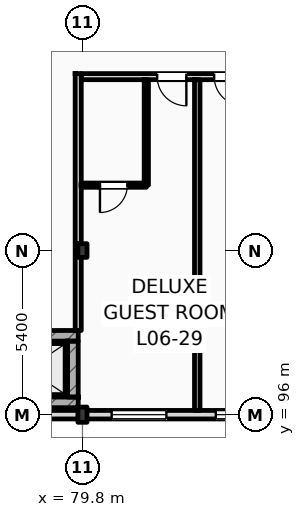
"""IFC4 building model, lengths in metres.
Left out: names, types, materials, properties, quantities, classifications, styles, units other than length and angle.
Written with IfcOpenShell. Run it as: python <this file> out.ifc"""

import sys

from ifc_helpers import new_model, si_unit, direction, frame, frame_2d, origin, origin_2d, place, context, subcontext, project, spatial, rectangle, i_section, extrude, element, fill, save


model = new_model("IFC4")
c1 = context("Model", 3, precision=1e-05, world=origin(), true_north=direction((0.0, 1.0)))
c2 = subcontext(c1, "Body", "Model", "MODEL_VIEW")
j1 = project(units=[si_unit("LENGTHUNIT", "METRE"), si_unit("PLANEANGLEUNIT", "RADIAN")], contexts=[c1])
p1 = place(None, origin())
s1 = spatial("IfcSite", under=j1, at=p1, CompositionType="ELEMENT")
p2 = place(p1, origin())
s2 = spatial("IfcBuilding", under=s1, at=p2, CompositionType="ELEMENT")
p3 = place(p2, frame((0.0, 0.0, 28.2)))
s3 = spatial("IfcBuildingStorey", under=s2, at=p3, CompositionType="ELEMENT", Elevation=28.2)
p4 = place(p3, frame((79.8, 96.0, 0.0), z_axis=(0.0, 0.0, 1.0), x_axis=(1.0, 0.0, 0.0)))
e1 = element("IfcColumn", 1, at=p4, inside=s3, PredefinedType="COLUMN", context=c2, shape_type="SweptSolid", body=[
    extrude(i_section(OverallWidth=0.3, OverallDepth=0.5, WebThickness=0.014, FlangeThickness=0.028, FilletRadius=0.027, at=origin_2d()), origin(), (0.0, 0.0, 1.0), 3.6),
])
p5 = place(p3, frame((79.8, 101.4, 0.0), z_axis=(0.0, 0.0, 1.0), x_axis=(1.0, 0.0, 0.0)))
e2 = element("IfcColumn", 2, at=p5, inside=s3, PredefinedType="COLUMN", context=c2, shape_type="SweptSolid", body=[
    extrude(i_section(OverallWidth=0.3, OverallDepth=0.45, WebThickness=0.014, FlangeThickness=0.026, FilletRadius=0.027, at=origin_2d()), origin(), (0.0, 0.0, 1.0), 3.6),
])
p6 = place(p3, frame((25.2, 96.0, 0.0), z_axis=(0.0, 0.0, 1.0), x_axis=(1.0, 0.0, 0.0)))
e3 = element("IfcWall", 3, at=p6, inside=s3, PredefinedType="STANDARD", context=c2, shape_type="SweptSolid", body=[
    extrude(rectangle(XDim=94.8, YDim=0.28, at=frame_2d((47.4, 0.0))), origin(), (0.0, 0.0, 1.0), 2.8),
])
p7 = place(p6, frame((16.454, 0.0, 0.9)))
e4 = element("IfcOpeningElement", 4, at=p7, cuts=e3, PredefinedType="OPENING", context=c2, shape_type="SweptSolid", body=[
    extrude(rectangle(XDim=2.7, YDim=1.72, at=frame_2d((1.35, 0.86))), frame((0.0, 0.15, 0.0), z_axis=(0.0, -1.0, 0.0), x_axis=(1.0, 0.0, 0.0)), (0.0, 0.0, 1.0), 0.3),
])
p8 = place(p6, frame((20.068, 0.0, 0.9)))
e5 = element("IfcOpeningElement", 5, at=p8, cuts=e3, PredefinedType="OPENING", context=c2, shape_type="SweptSolid", body=[
    extrude(rectangle(XDim=2.389, YDim=1.72, at=frame_2d((1.194, 0.86))), frame((0.0, 0.15, 0.0), z_axis=(0.0, -1.0, 0.0), x_axis=(1.0, 0.0, 0.0)), (0.0, 0.0, 1.0), 0.3),
])
p9 = place(p6, frame((24.277, 0.0, 0.9)))
e6 = element("IfcOpeningElement", 6, at=p9, cuts=e3, PredefinedType="OPENING", context=c2, shape_type="SweptSolid", body=[
    extrude(rectangle(XDim=1.8, YDim=1.72, at=frame_2d((0.9, 0.86))), frame((0.0, 0.15, 0.0), z_axis=(0.0, -1.0, 0.0), x_axis=(1.0, 0.0, 0.0)), (0.0, 0.0, 1.0), 0.3),
])
p10 = place(p6, frame((27.885, 0.0, 0.9)))
e7 = element("IfcOpeningElement", 7, at=p10, cuts=e3, PredefinedType="OPENING", context=c2, shape_type="SweptSolid", body=[
    extrude(rectangle(XDim=2.388, YDim=1.72, at=frame_2d((1.194, 0.86))), frame((0.0, 0.15, 0.0), z_axis=(0.0, -1.0, 0.0), x_axis=(1.0, 0.0, 0.0)), (0.0, 0.0, 1.0), 0.3),
])
p11 = place(p6, frame((32.093, 0.0, 0.9)))
e8 = element("IfcOpeningElement", 8, at=p11, cuts=e3, PredefinedType="OPENING", context=c2, shape_type="SweptSolid", body=[
    extrude(rectangle(XDim=1.8, YDim=1.72, at=frame_2d((0.9, 0.86))), frame((0.0, 0.15, 0.0), z_axis=(0.0, -1.0, 0.0), x_axis=(1.0, 0.0, 0.0)), (0.0, 0.0, 1.0), 0.3),
])
p12 = place(p6, frame((35.702, 0.0, 0.9)))
e9 = element("IfcOpeningElement", 9, at=p12, cuts=e3, PredefinedType="OPENING", context=c2, shape_type="SweptSolid", body=[
    extrude(rectangle(XDim=2.488, YDim=1.72, at=frame_2d((1.244, 0.86))), frame((0.0, 0.15, 0.0), z_axis=(0.0, -1.0, 0.0), x_axis=(1.0, 0.0, 0.0)), (0.0, 0.0, 1.0), 0.3),
])
p13 = place(p6, frame((55.56, 0.0, 0.9)))
e10 = element("IfcOpeningElement", 10, at=p13, cuts=e3, PredefinedType="OPENING", context=c2, shape_type="SweptSolid", body=[
    extrude(rectangle(XDim=1.8, YDim=1.72, at=frame_2d((0.9, 0.86))), frame((0.0, 0.15, 0.0), z_axis=(0.0, -1.0, 0.0), x_axis=(1.0, 0.0, 0.0)), (0.0, 0.0, 1.0), 0.3),
])
p14 = place(p6, frame((58.985, 0.0, 0.9)))
e11 = element("IfcOpeningElement", 11, at=p14, cuts=e3, PredefinedType="OPENING", context=c2, shape_type="SweptSolid", body=[
    extrude(rectangle(XDim=1.8, YDim=1.72, at=frame_2d((0.9, 0.86))), frame((0.0, 0.15, 0.0), z_axis=(0.0, -1.0, 0.0), x_axis=(1.0, 0.0, 0.0)), (0.0, 0.0, 1.0), 0.3),
])
p15 = place(p6, frame((63.21, 0.0, 0.9)))
e12 = element("IfcOpeningElement", 12, at=p15, cuts=e3, PredefinedType="OPENING", context=c2, shape_type="SweptSolid", body=[
    extrude(rectangle(XDim=2.525, YDim=1.72, at=frame_2d((1.262, 0.86))), frame((0.0, 0.15, 0.0), z_axis=(0.0, -1.0, 0.0), x_axis=(1.0, 0.0, 0.0)), (0.0, 0.0, 1.0), 0.3),
])
p16 = place(p6, frame((66.955, 0.0, 0.9)))
e13 = element("IfcOpeningElement", 13, at=p16, cuts=e3, PredefinedType="OPENING", context=c2, shape_type="SweptSolid", body=[
    extrude(rectangle(XDim=1.8, YDim=1.72, at=frame_2d((0.9, 0.86))), frame((0.0, 0.15, 0.0), z_axis=(0.0, -1.0, 0.0), x_axis=(1.0, 0.0, 0.0)), (0.0, 0.0, 1.0), 0.3),
])
p17 = place(p6, frame((71.892, 0.0, 0.9)))
e14 = element("IfcOpeningElement", 14, at=p17, cuts=e3, PredefinedType="OPENING", context=c2, shape_type="SweptSolid", body=[
    extrude(rectangle(XDim=1.1, YDim=1.5, at=frame_2d((0.55, 0.75))), frame((0.0, 0.15, 0.0), z_axis=(0.0, -1.0, 0.0), x_axis=(1.0, 0.0, 0.0)), (0.0, 0.0, 1.0), 0.3),
])
p18 = place(p6, frame((75.802, 0.0, 0.9)))
e15 = element("IfcOpeningElement", 15, at=p18, cuts=e3, PredefinedType="OPENING", context=c2, shape_type="SweptSolid", body=[
    extrude(rectangle(XDim=1.25, YDim=1.6, at=frame_2d((0.625, 0.8))), frame((0.0, 0.15, 0.0), z_axis=(0.0, -1.0, 0.0), x_axis=(1.0, 0.0, 0.0)), (0.0, 0.0, 1.0), 0.3),
])
p19 = place(p6, frame((79.712, 0.0, 0.9)))
e16 = element("IfcOpeningElement", 16, at=p19, cuts=e3, PredefinedType="OPENING", context=c2, shape_type="SweptSolid", body=[
    extrude(rectangle(XDim=1.4, YDim=1.7, at=frame_2d((0.7, 0.85))), frame((0.0, 0.15, 0.0), z_axis=(0.0, -1.0, 0.0), x_axis=(1.0, 0.0, 0.0)), (0.0, 0.0, 1.0), 0.3),
])
p20 = place(p6, frame((83.597, 0.0, 0.9)))
e17 = element("IfcOpeningElement", 17, at=p20, cuts=e3, PredefinedType="OPENING", context=c2, shape_type="SweptSolid", body=[
    extrude(rectangle(XDim=1.6, YDim=1.72, at=frame_2d((0.8, 0.86))), frame((0.0, 0.15, 0.0), z_axis=(0.0, -1.0, 0.0), x_axis=(1.0, 0.0, 0.0)), (0.0, 0.0, 1.0), 0.3),
])
p21 = place(p6, frame((87.507, 0.0, 0.9)))
e18 = element("IfcOpeningElement", 18, at=p21, cuts=e3, PredefinedType="OPENING", context=c2, shape_type="SweptSolid", body=[
    extrude(rectangle(XDim=1.75, YDim=1.72, at=frame_2d((0.875, 0.86))), frame((0.0, 0.15, 0.0), z_axis=(0.0, -1.0, 0.0), x_axis=(1.0, 0.0, 0.0)), (0.0, 0.0, 1.0), 0.3),
])
p22 = place(p6, frame((91.328, 0.0, 0.9)))
e19 = element("IfcOpeningElement", 19, at=p22, cuts=e3, PredefinedType="OPENING", context=c2, shape_type="SweptSolid", body=[
    extrude(rectangle(XDim=2.0, YDim=1.72, at=frame_2d((1.0, 0.86))), frame((0.0, 0.15, 0.0), z_axis=(0.0, -1.0, 0.0), x_axis=(1.0, 0.0, 0.0)), (0.0, 0.0, 1.0), 0.3),
])
p23 = place(p3, frame((76.67, 98.595, 0.0), z_axis=(0.0, 0.0, 1.0), x_axis=(1.0, 0.0, 0.0)))
e20 = element("IfcWall", 20, at=p23, inside=s3, PredefinedType="SHEAR", context=c2, shape_type="SweptSolid", body=[
    extrude(rectangle(XDim=2.99, YDim=0.35, at=frame_2d((1.495, 0.0))), origin(), (0.0, 0.0, 1.0), 3.36),
])
p24 = place(p23, frame((0.695, 0.0, 0.0)))
e21 = element("IfcOpeningElement", 21, at=p24, cuts=e20, PredefinedType="OPENING", context=c2, shape_type="SweptSolid", body=[
    extrude(rectangle(XDim=1.25, YDim=2.25, at=frame_2d((0.625, 1.125))), frame((0.0, 0.185, 0.0), z_axis=(0.0, -1.0, 0.0), x_axis=(1.0, 0.0, 0.0)), (0.0, 0.0, 1.0), 0.37),
])
p25 = place(p3, frame((76.67, 96.405, 0.0), z_axis=(0.0, 0.0, 1.0), x_axis=(1.0, 0.0, 0.0)))
e22 = element("IfcWall", 22, at=p25, inside=s3, PredefinedType="SHEAR", context=c2, shape_type="SweptSolid", body=[
    extrude(rectangle(XDim=2.99, YDim=0.35, at=frame_2d((1.495, 0.0))), origin(), (0.0, 0.0, 1.0), 3.36),
])
p26 = place(p3, frame((79.485, 96.58, 0.0), z_axis=(0.0, 0.0, 1.0), x_axis=(0.0, 1.0, 0.0)))
e23 = element("IfcWall", 23, at=p26, inside=s3, PredefinedType="SHEAR", context=c2, shape_type="SweptSolid", body=[
    extrude(rectangle(XDim=1.84, YDim=0.35, at=frame_2d((0.92, 0.0))), origin(), (0.0, 0.0, 1.0), 2.99),
])
p27 = place(p3, frame((79.76, 107.12, 0.0), z_axis=(0.0, 0.0, 1.0), x_axis=(1.0, 0.0, 0.0)))
e24 = element("IfcWall", 24, at=p27, inside=s3, PredefinedType="PARTITIONING", context=c2, shape_type="SweptSolid", body=[
    extrude(rectangle(XDim=40.1, YDim=0.2, at=frame_2d((20.05, 0.0))), origin(), (0.0, 0.0, 1.0), 3.36),
])
p28 = place(p27, frame((2.497, 0.0, 0.0)))
e25 = element("IfcOpeningElement", 25, at=p28, cuts=e24, PredefinedType="OPENING", context=c2, shape_type="SweptSolid", body=[
    extrude(rectangle(XDim=0.96, YDim=2.2, at=frame_2d((0.48, 1.1))), frame((0.0, 0.11, 0.0), z_axis=(0.0, -1.0, 0.0), x_axis=(1.0, 0.0, 0.0)), (0.0, 0.0, 1.0), 0.22),
])
p29 = place(p27, frame((4.372, 0.0, 0.0)))
e26 = element("IfcOpeningElement", 26, at=p29, cuts=e24, PredefinedType="OPENING", context=c2, shape_type="SweptSolid", body=[
    extrude(rectangle(XDim=0.96, YDim=2.2, at=frame_2d((0.48, 1.1))), frame((0.0, 0.11, 0.0), z_axis=(0.0, -1.0, 0.0), x_axis=(1.0, 0.0, 0.0)), (0.0, 0.0, 1.0), 0.22),
])
p30 = place(p27, frame((10.507, 0.0, 0.0)))
e27 = element("IfcOpeningElement", 27, at=p30, cuts=e24, PredefinedType="OPENING", context=c2, shape_type="SweptSolid", body=[
    extrude(rectangle(XDim=0.96, YDim=2.2, at=frame_2d((0.48, 1.1))), frame((0.0, 0.11, 0.0), z_axis=(0.0, -1.0, 0.0), x_axis=(1.0, 0.0, 0.0)), (0.0, 0.0, 1.0), 0.22),
])
p31 = place(p27, frame((12.342, 0.0, 0.0)))
e28 = element("IfcOpeningElement", 28, at=p31, cuts=e24, PredefinedType="OPENING", context=c2, shape_type="SweptSolid", body=[
    extrude(rectangle(XDim=0.96, YDim=2.2, at=frame_2d((0.48, 1.1))), frame((0.0, 0.11, 0.0), z_axis=(0.0, -1.0, 0.0), x_axis=(1.0, 0.0, 0.0)), (0.0, 0.0, 1.0), 0.22),
])
p32 = place(p27, frame((18.477, 0.0, 0.0)))
e29 = element("IfcOpeningElement", 29, at=p32, cuts=e24, PredefinedType="OPENING", context=c2, shape_type="SweptSolid", body=[
    extrude(rectangle(XDim=0.96, YDim=2.2, at=frame_2d((0.48, 1.1))), frame((0.0, 0.11, 0.0), z_axis=(0.0, -1.0, 0.0), x_axis=(1.0, 0.0, 0.0)), (0.0, 0.0, 1.0), 0.22),
])
p33 = place(p27, frame((20.312, 0.0, 0.0)))
e30 = element("IfcOpeningElement", 30, at=p33, cuts=e24, PredefinedType="OPENING", context=c2, shape_type="SweptSolid", body=[
    extrude(rectangle(XDim=0.96, YDim=2.2, at=frame_2d((0.48, 1.1))), frame((0.0, 0.11, 0.0), z_axis=(0.0, -1.0, 0.0), x_axis=(1.0, 0.0, 0.0)), (0.0, 0.0, 1.0), 0.22),
])
p34 = place(p27, frame((26.447, 0.0, 0.0)))
e31 = element("IfcOpeningElement", 31, at=p34, cuts=e24, PredefinedType="OPENING", context=c2, shape_type="SweptSolid", body=[
    extrude(rectangle(XDim=0.96, YDim=2.2, at=frame_2d((0.48, 1.1))), frame((0.0, 0.11, 0.0), z_axis=(0.0, -1.0, 0.0), x_axis=(1.0, 0.0, 0.0)), (0.0, 0.0, 1.0), 0.22),
])
p35 = place(p27, frame((28.282, 0.0, 0.0)))
e32 = element("IfcOpeningElement", 32, at=p35, cuts=e24, PredefinedType="OPENING", context=c2, shape_type="SweptSolid", body=[
    extrude(rectangle(XDim=0.96, YDim=2.2, at=frame_2d((0.48, 1.1))), frame((0.0, 0.11, 0.0), z_axis=(0.0, -1.0, 0.0), x_axis=(1.0, 0.0, 0.0)), (0.0, 0.0, 1.0), 0.22),
])
p36 = place(p27, frame((34.417, 0.0, 0.0)))
e33 = element("IfcOpeningElement", 33, at=p36, cuts=e24, PredefinedType="OPENING", context=c2, shape_type="SweptSolid", body=[
    extrude(rectangle(XDim=0.96, YDim=2.2, at=frame_2d((0.48, 1.1))), frame((0.0, 0.11, 0.0), z_axis=(0.0, -1.0, 0.0), x_axis=(1.0, 0.0, 0.0)), (0.0, 0.0, 1.0), 0.22),
])
p37 = place(p27, frame((36.212, 0.0, 0.0)))
e34 = element("IfcOpeningElement", 34, at=p37, cuts=e24, PredefinedType="OPENING", context=c2, shape_type="SweptSolid", body=[
    extrude(rectangle(XDim=0.96, YDim=2.2, at=frame_2d((0.48, 1.1))), frame((0.0, 0.11, 0.0), z_axis=(0.0, -1.0, 0.0), x_axis=(1.0, 0.0, 0.0)), (0.0, 0.0, 1.0), 0.22),
])
p38 = place(p3, frame((79.66, 98.77, 0.0), z_axis=(0.0, 0.0, 1.0), x_axis=(0.0, 1.0, 0.0)))
e35 = element("IfcWall", 35, at=p38, inside=s3, PredefinedType="PARTITIONING", context=c2, shape_type="SweptSolid", body=[
    extrude(rectangle(XDim=8.45, YDim=0.2, at=frame_2d((4.225, 0.0))), origin(), (0.0, 0.0, 1.0), 2.99),
])
p39 = place(p3, frame((83.575, 96.14, 0.0), z_axis=(0.0, 0.0, 1.0), x_axis=(0.0, 1.0, 0.0)))
e36 = element("IfcWall", 36, at=p39, inside=s3, PredefinedType="PARTITIONING", context=c2, shape_type="SweptSolid", body=[
    extrude(rectangle(XDim=10.88, YDim=0.18, at=frame_2d((5.44, 0.0))), origin(), (0.0, 0.0, 1.0), 3.36),
])
p40 = place(p3, frame((81.9, 103.55, 0.0), z_axis=(0.0, 0.0, 1.0), x_axis=(0.0, 1.0, 0.0)))
e37 = element("IfcWall", 37, at=p40, inside=s3, PredefinedType="PARTITIONING", context=c2, shape_type="SweptSolid", body=[
    extrude(rectangle(XDim=3.47, YDim=0.14, at=frame_2d((1.735, 0.0))), origin(), (0.0, 0.0, 1.0), 3.36),
])
p41 = place(p3, frame((79.75, 103.55, 0.0), z_axis=(0.0, 0.0, 1.0), x_axis=(1.0, 0.0, 0.0)))
e38 = element("IfcWall", 38, at=p41, inside=s3, PredefinedType="PARTITIONING", context=c2, shape_type="SweptSolid", body=[
    extrude(rectangle(XDim=2.15, YDim=0.14, at=frame_2d((1.075, 0.0))), origin(), (0.0, 0.0, 1.0), 3.36),
])
p42 = place(p41, frame((0.625, 0.0, 0.0)))
e39 = element("IfcOpeningElement", 39, at=p42, cuts=e38, PredefinedType="OPENING", context=c2, shape_type="SweptSolid", body=[
    extrude(rectangle(XDim=0.9, YDim=2.1, at=frame_2d((0.45, 1.05))), frame((0.0, 0.08, 0.0), z_axis=(0.0, -1.0, 0.0), x_axis=(1.0, 0.0, 0.0)), (0.0, 0.0, 1.0), 0.16),
])
p43 = place(p13, origin())
e40 = element("IfcWindow", 40, at=p43, inside=s3, PartitioningType="DOUBLE_PANEL_VERTICAL", PredefinedType="WINDOW", context=c2, shape_type="SweptSolid", body=[
    extrude(rectangle(XDim=1.8, YDim=1.72, at=frame_2d((0.9, 0.86))), frame((0.0, 0.03, 0.0), z_axis=(0.0, -1.0, 0.0), x_axis=(1.0, 0.0, 0.0)), (0.0, 0.0, 1.0), 0.06),
])
fill(e10, e40)
p44 = place(p14, origin())
e41 = element("IfcWindow", 41, at=p44, inside=s3, PartitioningType="DOUBLE_PANEL_VERTICAL", PredefinedType="WINDOW", context=c2, shape_type="SweptSolid", body=[
    extrude(rectangle(XDim=1.8, YDim=1.72, at=frame_2d((0.9, 0.86))), frame((0.0, 0.03, 0.0), z_axis=(0.0, -1.0, 0.0), x_axis=(1.0, 0.0, 0.0)), (0.0, 0.0, 1.0), 0.06),
])
fill(e11, e41)
p45 = place(p28, frame((0.96, 0.0, 0.0), z_axis=(0.0, 0.0, 1.0), x_axis=(-1.0, 0.0, 0.0)))
e42 = element("IfcDoor", 42, at=p45, inside=s3, OperationType="SINGLE_SWING_RIGHT", PredefinedType="DOOR", context=c2, shape_type="SweptSolid", body=[
    extrude(rectangle(XDim=0.96, YDim=2.2, at=frame_2d((0.48, 1.1))), frame((0.0, 0.025, 0.0), z_axis=(0.0, -1.0, 0.0), x_axis=(1.0, 0.0, 0.0)), (0.0, 0.0, 1.0), 0.05),
])
fill(e25, e42)
p46 = place(p42, frame((0.9, 0.0, 0.0), z_axis=(0.0, 0.0, 1.0), x_axis=(-1.0, 0.0, 0.0)))
e43 = element("IfcDoor", 43, at=p46, inside=s3, OperationType="SINGLE_SWING_LEFT", PredefinedType="DOOR", context=c2, shape_type="SweptSolid", body=[
    extrude(rectangle(XDim=0.9, YDim=2.1, at=frame_2d((0.45, 1.05))), frame((0.0, 0.025, 0.0), z_axis=(0.0, -1.0, 0.0), x_axis=(1.0, 0.0, 0.0)), (0.0, 0.0, 1.0), 0.05),
])
fill(e39, e43)
p47 = place(p29, frame((0.96, 0.0, 0.0), z_axis=(0.0, 0.0, 1.0), x_axis=(-1.0, 0.0, 0.0)))
e44 = element("IfcDoor", 44, at=p47, inside=s3, OperationType="SINGLE_SWING_RIGHT", PredefinedType="DOOR", context=c2, shape_type="SweptSolid", body=[
    extrude(rectangle(XDim=0.96, YDim=2.2, at=frame_2d((0.48, 1.1))), frame((0.0, 0.025, 0.0), z_axis=(0.0, -1.0, 0.0), x_axis=(1.0, 0.0, 0.0)), (0.0, 0.0, 1.0), 0.05),
])
fill(e26, e44)
save(model, sys.argv[1])
